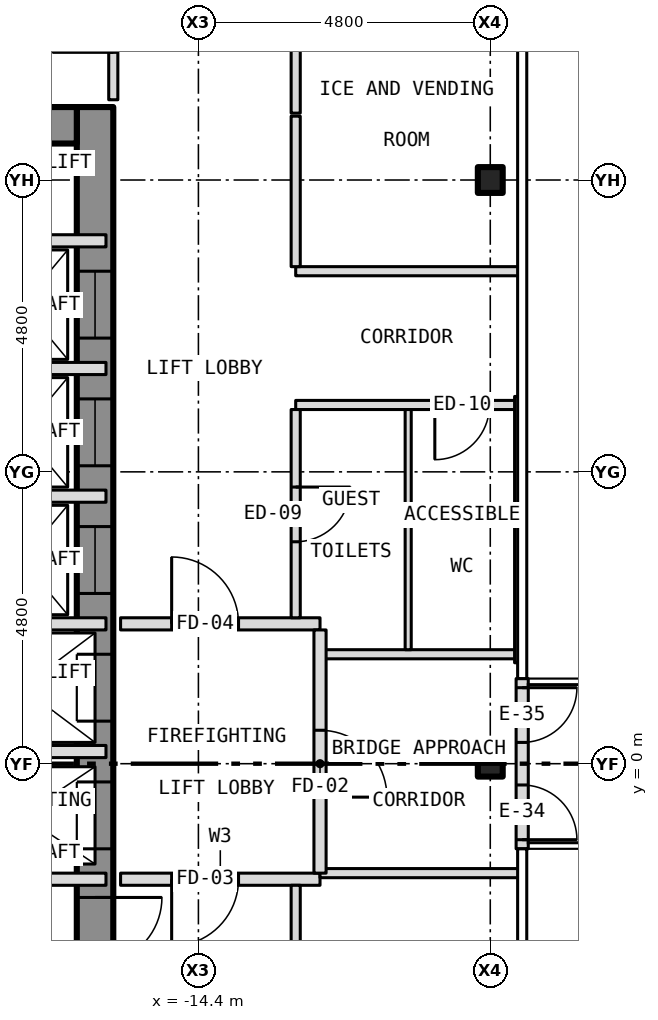
"""IFC4 building model, lengths in metres.
Left out: names, types, materials, properties, quantities, classifications, styles, units other than length and angle.
Written with IfcOpenShell. Run it as: python <this file> out.ifc"""

import sys

from ifc_helpers import new_model, si_unit, direction, frame, frame_2d, origin, origin_2d, place, context, subcontext, project, spatial, rectangle, i_section, extrude, element, fill, save


model = new_model("IFC4")
c1 = context("Model", 3, precision=1e-05, world=origin(), true_north=direction((0.0, 1.0)))
c2 = subcontext(c1, "Body", "Model", "MODEL_VIEW")
j1 = project(units=[si_unit("LENGTHUNIT", "METRE"), si_unit("PLANEANGLEUNIT", "RADIAN")], contexts=[c1])
p1 = place(None, origin())
s1 = spatial("IfcSite", under=j1, at=p1, CompositionType="ELEMENT")
p2 = place(p1, origin())
s2 = spatial("IfcBuilding", under=s1, at=p2, CompositionType="ELEMENT")
p3 = place(p2, frame((0.0, 0.0, 74.0)))
s3 = spatial("IfcBuildingStorey", under=s2, at=p3, CompositionType="ELEMENT", Elevation=74.0)
for number, where, z_axis, x_axis in (
    (1, (-9.6, 0.0, -0.15), (0.0, 0.0, 1.0), (1.0, 0.0, 0.0)),
    (2, (-9.6, 9.6, -0.15), (0.0, 0.0, 1.0), (1.0, 0.0, 0.0)),
):
    element("IfcColumn", number, at=place(p3, frame(where, z_axis=z_axis, x_axis=x_axis)), inside=s3, PredefinedType="COLUMN", context=c2, shape_type="SweptSolid", body=[
        extrude(i_section(OverallWidth=0.409, OverallDepth=0.424, WebThickness=0.033, FlangeThickness=0.052, at=origin_2d()), origin(), (0.0, 0.0, 1.0), 3.5),
    ])
p4 = place(p3, frame((-16.1, -10.8, 0.0), z_axis=(0.0, 0.0, 1.0), x_axis=(0.0, 1.0, 0.0)))
e3 = element("IfcWall", 3, at=p4, inside=s3, PredefinedType="SHEAR", context=c2, shape_type="SweptSolid", body=[
    extrude(rectangle(XDim=21.6, YDim=0.6, at=frame_2d((10.8, 0.0))), origin(), (0.0, 0.0, 1.0), 3.25),
])
p5 = place(p4, frame((9.4, 0.0, 0.0)))
e4 = element("IfcOpeningElement", 4, at=p5, cuts=e3, PredefinedType="OPENING", context=c2, shape_type="SweptSolid", body=[
    extrude(rectangle(XDim=1.1, YDim=2.1, at=frame_2d((0.55, 1.05))), frame((0.0, 0.312, 0.0), z_axis=(0.0, -1.0, 0.0), x_axis=(1.0, 0.0, 0.0)), (0.0, 0.0, 1.0), 0.624),
])
p6 = place(p4, frame((11.5, 0.0, 0.0)))
e5 = element("IfcOpeningElement", 5, at=p6, cuts=e3, PredefinedType="OPENING", context=c2, shape_type="SweptSolid", body=[
    extrude(rectangle(XDim=1.1, YDim=2.1, at=frame_2d((0.55, 1.05))), frame((0.0, 0.312, 0.0), z_axis=(0.0, -1.0, 0.0), x_axis=(1.0, 0.0, 0.0)), (0.0, 0.0, 1.0), 0.624),
])
p7 = place(p4, frame((13.6, 0.0, 0.0)))
e6 = element("IfcOpeningElement", 6, at=p7, cuts=e3, PredefinedType="OPENING", context=c2, shape_type="SweptSolid", body=[
    extrude(rectangle(XDim=1.1, YDim=2.1, at=frame_2d((0.55, 1.05))), frame((0.0, 0.312, 0.0), z_axis=(0.0, -1.0, 0.0), x_axis=(1.0, 0.0, 0.0)), (0.0, 0.0, 1.0), 0.624),
])
p8 = place(p4, frame((15.7, 0.0, 0.0)))
e7 = element("IfcOpeningElement", 7, at=p8, cuts=e3, PredefinedType="OPENING", context=c2, shape_type="SweptSolid", body=[
    extrude(rectangle(XDim=1.1, YDim=2.1, at=frame_2d((0.55, 1.05))), frame((0.0, 0.312, 0.0), z_axis=(0.0, -1.0, 0.0), x_axis=(1.0, 0.0, 0.0)), (0.0, 0.0, 1.0), 0.624),
])
p9 = place(p4, frame((17.8, 0.0, 0.0)))
e8 = element("IfcOpeningElement", 8, at=p9, cuts=e3, PredefinedType="OPENING", context=c2, shape_type="SweptSolid", body=[
    extrude(rectangle(XDim=1.1, YDim=2.1, at=frame_2d((0.55, 1.05))), frame((0.0, 0.312, 0.0), z_axis=(0.0, -1.0, 0.0), x_axis=(1.0, 0.0, 0.0)), (0.0, 0.0, 1.0), 0.624),
])
p10 = place(p4, frame((0.758, 0.0, 0.0)))
e9 = element("IfcOpeningElement", 9, at=p10, cuts=e3, PredefinedType="OPENING", context=c2, shape_type="SweptSolid", body=[
    extrude(rectangle(XDim=1.1, YDim=2.1, at=frame_2d((0.55, 1.05))), frame((0.0, 0.312, 0.0), z_axis=(0.0, -1.0, 0.0), x_axis=(1.0, 0.0, 0.0)), (0.0, 0.0, 1.0), 0.624),
])
p11 = place(p4, frame((7.5, 0.0, 0.0)))
e10 = element("IfcOpeningElement", 10, at=p11, cuts=e3, PredefinedType="OPENING", context=c2, shape_type="SweptSolid", body=[
    extrude(rectangle(XDim=1.1, YDim=2.1, at=frame_2d((0.55, 1.05))), frame((0.0, 0.312, 0.0), z_axis=(0.0, -1.0, 0.0), x_axis=(1.0, 0.0, 0.0)), (0.0, 0.0, 1.0), 0.624),
])
p12 = place(p3, frame((-23.4, 10.5, 0.0), z_axis=(0.0, 0.0, 1.0), x_axis=(1.0, 0.0, 0.0)))
e11 = element("IfcWall", 11, at=p12, inside=s3, PredefinedType="SHEAR", context=c2, shape_type="SweptSolid", body=[
    extrude(rectangle(XDim=7.0, YDim=0.6, at=frame_2d((3.5, 0.0))), origin(), (0.0, 0.0, 1.0), 3.25),
])
p13 = place(p3, frame((-9.075, -1.4, 0.0), z_axis=(0.0, 0.0, 1.0), x_axis=(0.0, 1.0, 0.0)))
e12 = element("IfcWall", 12, at=p13, inside=s3, PredefinedType="SOLIDWALL", context=c2, shape_type="SweptSolid", body=[
    extrude(rectangle(XDim=2.8, YDim=0.2, at=frame_2d((1.4, 0.0))), origin(), (0.0, 0.0, 1.0), 3.5),
])
p14 = place(p13, frame((0.15, 0.0, 0.0)))
e13 = element("IfcOpeningElement", 13, at=p14, cuts=e12, PredefinedType="OPENING", context=c2, shape_type="SweptSolid", body=[
    extrude(rectangle(XDim=0.9, YDim=2.1, at=frame_2d((0.45, 1.05))), frame((0.0, 0.112, 0.0), z_axis=(0.0, -1.0, 0.0), x_axis=(1.0, 0.0, 0.0)), (0.0, 0.0, 1.0), 0.224),
])
p15 = place(p13, frame((1.75, 0.0, 0.0)))
e14 = element("IfcOpeningElement", 14, at=p15, cuts=e12, PredefinedType="OPENING", context=c2, shape_type="SweptSolid", body=[
    extrude(rectangle(XDim=0.9, YDim=2.1, at=frame_2d((0.45, 1.05))), frame((0.0, 0.112, 0.0), z_axis=(0.0, -1.0, 0.0), x_axis=(1.0, 0.0, 0.0)), (0.0, 0.0, 1.0), 0.224),
])
p16 = place(p3, frame((-23.88, -1.9, 0.0), z_axis=(0.0, 0.0, 1.0), x_axis=(1.0, 0.0, 0.0)))
e15 = element("IfcWall", 15, at=p16, inside=s3, PredefinedType="PARTITIONING", context=c2, shape_type="SweptSolid", body=[
    extrude(rectangle(XDim=7.96, YDim=0.2, at=frame_2d((3.98, 0.0))), origin(), (0.0, 0.0, 1.0), 3.25),
])
p17 = place(p16, frame((3.32, 0.0, 0.0)))
e16 = element("IfcOpeningElement", 16, at=p17, cuts=e15, PredefinedType="OPENING", context=c2, shape_type="SweptSolid", body=[
    extrude(rectangle(XDim=0.9, YDim=2.1, at=frame_2d((0.45, 1.05))), frame((0.0, 0.112, 0.0), z_axis=(0.0, -1.0, 0.0), x_axis=(1.0, 0.0, 0.0)), (0.0, 0.0, 1.0), 0.224),
])
p18 = place(p3, frame((-15.68, -1.9, 0.0), z_axis=(0.0, 0.0, 1.0), x_axis=(1.0, 0.0, 0.0)))
e17 = element("IfcWall", 17, at=p18, inside=s3, PredefinedType="PARTITIONING", context=c2, shape_type="SweptSolid", body=[
    extrude(rectangle(XDim=3.28, YDim=0.2, at=frame_2d((1.64, 0.0))), origin(), (0.0, 0.0, 1.0), 3.35),
])
p19 = place(p18, frame((0.84, 0.0, 0.0)))
e18 = element("IfcOpeningElement", 18, at=p19, cuts=e17, PredefinedType="OPENING", context=c2, shape_type="SweptSolid", body=[
    extrude(rectangle(XDim=1.1, YDim=2.1, at=frame_2d((0.55, 1.05))), frame((0.0, 0.112, 0.0), z_axis=(0.0, -1.0, 0.0), x_axis=(1.0, 0.0, 0.0)), (0.0, 0.0, 1.0), 0.224),
])
p20 = place(p3, frame((-12.4, -1.8, 0.0), z_axis=(0.0, 0.0, 1.0), x_axis=(1.0, 0.0, 0.0)))
e19 = element("IfcWall", 19, at=p20, inside=s3, PredefinedType="PARTITIONING", context=c2, shape_type="SweptSolid", body=[
    extrude(rectangle(XDim=3.28, YDim=0.15, at=frame_2d((1.64, 0.0))), origin(), (0.0, 0.0, 1.0), 3.35),
])
p21 = place(p3, frame((-18.8, 0.2, 0.0), z_axis=(0.0, 0.0, 1.0), x_axis=(1.0, 0.0, 0.0)))
e20 = element("IfcWall", 20, at=p21, inside=s3, PredefinedType="PARTITIONING", context=c2, shape_type="SweptSolid", body=[
    extrude(rectangle(XDim=2.88, YDim=0.2, at=frame_2d((1.44, 0.0))), origin(), (0.0, 0.0, 1.0), 3.25),
])
p22 = place(p3, frame((-12.4, 1.8, 0.0), z_axis=(0.0, 0.0, 1.0), x_axis=(1.0, 0.0, 0.0)))
e21 = element("IfcWall", 21, at=p22, inside=s3, PredefinedType="PARTITIONING", context=c2, shape_type="SweptSolid", body=[
    extrude(rectangle(XDim=3.25, YDim=0.15, at=frame_2d((1.625, 0.0))), origin(), (0.0, 0.0, 1.0), 3.35),
])
p23 = place(p3, frame((-18.8, 2.3, 0.0), z_axis=(0.0, 0.0, 1.0), x_axis=(1.0, 0.0, 0.0)))
e22 = element("IfcWall", 22, at=p23, inside=s3, PredefinedType="PARTITIONING", context=c2, shape_type="SweptSolid", body=[
    extrude(rectangle(XDim=2.88, YDim=0.2, at=frame_2d((1.44, 0.0))), origin(), (0.0, 0.0, 1.0), 3.25),
])
p24 = place(p3, frame((-15.68, 2.3, 0.0), z_axis=(0.0, 0.0, 1.0), x_axis=(1.0, 0.0, 0.0)))
e23 = element("IfcWall", 23, at=p24, inside=s3, PredefinedType="PARTITIONING", context=c2, shape_type="SweptSolid", body=[
    extrude(rectangle(XDim=3.28, YDim=0.2, at=frame_2d((1.64, 0.0))), origin(), (0.0, 0.0, 1.0), 3.35),
])
p25 = place(p24, frame((0.84, 0.0, 0.0)))
e24 = element("IfcOpeningElement", 24, at=p25, cuts=e23, PredefinedType="OPENING", context=c2, shape_type="SweptSolid", body=[
    extrude(rectangle(XDim=1.1, YDim=2.1, at=frame_2d((0.55, 1.05))), frame((0.0, 0.112, 0.0), z_axis=(0.0, -1.0, 0.0), x_axis=(1.0, 0.0, 0.0)), (0.0, 0.0, 1.0), 0.224),
])
p26 = place(p3, frame((-18.8, 4.4, 0.0), z_axis=(0.0, 0.0, 1.0), x_axis=(1.0, 0.0, 0.0)))
e25 = element("IfcWall", 25, at=p26, inside=s3, PredefinedType="PARTITIONING", context=c2, shape_type="SweptSolid", body=[
    extrude(rectangle(XDim=2.88, YDim=0.2, at=frame_2d((1.44, 0.0))), origin(), (0.0, 0.0, 1.0), 3.25),
])
p27 = place(p3, frame((-12.8, 5.9, 0.0), z_axis=(0.0, 0.0, 1.0), x_axis=(1.0, 0.0, 0.0)))
e26 = element("IfcWall", 26, at=p27, inside=s3, PredefinedType="PARTITIONING", context=c2, shape_type="SweptSolid", body=[
    extrude(rectangle(XDim=3.65, YDim=0.15, at=frame_2d((1.825, 0.0))), origin(), (0.0, 0.0, 1.0), 3.35),
])
p28 = place(p27, frame((2.288, 0.0, 0.0)))
e27 = element("IfcOpeningElement", 27, at=p28, cuts=e26, PredefinedType="OPENING", context=c2, shape_type="SweptSolid", body=[
    extrude(rectangle(XDim=0.9, YDim=2.1, at=frame_2d((0.45, 1.05))), frame((0.0, 0.087, 0.0), z_axis=(0.0, -1.0, 0.0), x_axis=(1.0, 0.0, 0.0)), (0.0, 0.0, 1.0), 0.174),
])
p29 = place(p3, frame((-18.8, 6.5, 0.0), z_axis=(0.0, 0.0, 1.0), x_axis=(1.0, 0.0, 0.0)))
e28 = element("IfcWall", 28, at=p29, inside=s3, PredefinedType="PARTITIONING", context=c2, shape_type="SweptSolid", body=[
    extrude(rectangle(XDim=2.88, YDim=0.2, at=frame_2d((1.44, 0.0))), origin(), (0.0, 0.0, 1.0), 3.25),
])
p30 = place(p3, frame((-12.8, 8.1, 0.0), z_axis=(0.0, 0.0, 1.0), x_axis=(1.0, 0.0, 0.0)))
e29 = element("IfcWall", 29, at=p30, inside=s3, PredefinedType="PARTITIONING", context=c2, shape_type="SweptSolid", body=[
    extrude(rectangle(XDim=3.68, YDim=0.15, at=frame_2d((1.84, 0.0))), origin(), (0.0, 0.0, 1.0), 3.35),
])
p31 = place(p3, frame((-18.8, 8.6, 0.0), z_axis=(0.0, 0.0, 1.0), x_axis=(1.0, 0.0, 0.0)))
e30 = element("IfcWall", 30, at=p31, inside=s3, PredefinedType="PARTITIONING", context=c2, shape_type="SweptSolid", body=[
    extrude(rectangle(XDim=2.88, YDim=0.2, at=frame_2d((1.44, 0.0))), origin(), (0.0, 0.0, 1.0), 3.25),
])
p32 = place(p3, frame((-15.8, 10.92, 0.0), z_axis=(0.0, 0.0, 1.0), x_axis=(0.0, 1.0, 0.0)))
e31 = element("IfcWall", 31, at=p32, inside=s3, PredefinedType="PARTITIONING", context=c2, shape_type="SweptSolid", body=[
    extrude(rectangle(XDim=4.805, YDim=0.15, at=frame_2d((2.403, 0.0))), origin(), (0.0, 0.0, 1.0), 3.35),
])
p33 = place(p32, frame((0.78, 0.0, 0.0)))
e32 = element("IfcOpeningElement", 32, at=p33, cuts=e31, PredefinedType="OPENING", context=c2, shape_type="SweptSolid", body=[
    extrude(rectangle(XDim=1.0, YDim=2.1, at=frame_2d((0.5, 1.05))), frame((0.0, 0.087, 0.0), z_axis=(0.0, -1.0, 0.0), x_axis=(1.0, 0.0, 0.0)), (0.0, 0.0, 1.0), 0.174),
])
p34 = place(p3, frame((-12.8, -13.525, 0.0), z_axis=(0.0, 0.0, 1.0), x_axis=(0.0, 1.0, 0.0)))
e33 = element("IfcWall", 33, at=p34, inside=s3, PredefinedType="PARTITIONING", context=c2, shape_type="SweptSolid", body=[
    extrude(rectangle(XDim=11.525, YDim=0.15, at=frame_2d((5.762, 0.0))), origin(), (0.0, 0.0, 1.0), 3.35),
])
p35 = place(p34, frame((6.725, 0.0, 0.0)))
e34 = element("IfcOpeningElement", 34, at=p35, cuts=e33, PredefinedType="OPENING", context=c2, shape_type="SweptSolid", body=[
    extrude(rectangle(XDim=0.9, YDim=2.1, at=frame_2d((0.45, 1.05))), frame((0.0, 0.087, 0.0), z_axis=(0.0, -1.0, 0.0), x_axis=(1.0, 0.0, 0.0)), (0.0, 0.0, 1.0), 0.174),
])
p36 = place(p3, frame((-12.8, 2.4, 0.0), z_axis=(0.0, 0.0, 1.0), x_axis=(0.0, 1.0, 0.0)))
e35 = element("IfcWall", 35, at=p36, inside=s3, PredefinedType="PARTITIONING", context=c2, shape_type="SweptSolid", body=[
    extrude(rectangle(XDim=3.425, YDim=0.15, at=frame_2d((1.712, 0.0))), origin(), (0.0, 0.0, 1.0), 3.35),
])
p37 = place(p36, frame((1.25, 0.0, 0.0)))
e36 = element("IfcOpeningElement", 36, at=p37, cuts=e35, PredefinedType="OPENING", context=c2, shape_type="SweptSolid", body=[
    extrude(rectangle(XDim=0.9, YDim=2.1, at=frame_2d((0.45, 1.05))), frame((0.0, 0.087, 0.0), z_axis=(0.0, -1.0, 0.0), x_axis=(1.0, 0.0, 0.0)), (0.0, 0.0, 1.0), 0.174),
])
p38 = place(p3, frame((-12.8, 8.175, 0.0), z_axis=(0.0, 0.0, 1.0), x_axis=(0.0, 1.0, 0.0)))
e37 = element("IfcWall", 37, at=p38, inside=s3, PredefinedType="PARTITIONING", context=c2, shape_type="SweptSolid", body=[
    extrude(rectangle(XDim=2.475, YDim=0.15, at=frame_2d((1.237, 0.0))), origin(), (0.0, 0.0, 1.0), 3.35),
])
p39 = place(p3, frame((-12.8, 10.7, 0.0), z_axis=(0.0, 0.0, 1.0), x_axis=(0.0, 1.0, 0.0)))
e38 = element("IfcWall", 38, at=p39, inside=s3, PredefinedType="PARTITIONING", context=c2, shape_type="SweptSolid", body=[
    extrude(rectangle(XDim=2.825, YDim=0.15, at=frame_2d((1.413, 0.0))), origin(), (0.0, 0.0, 1.0), 3.35),
])
p40 = place(p3, frame((-12.4, -1.8, 0.0), z_axis=(0.0, 0.0, 1.0), x_axis=(0.0, 1.0, 0.0)))
e39 = element("IfcWall", 39, at=p40, inside=s3, PredefinedType="PARTITIONING", context=c2, shape_type="SweptSolid", body=[
    extrude(rectangle(XDim=4.0, YDim=0.2, at=frame_2d((2.0, 0.0))), origin(), (0.0, 0.0, 1.0), 3.35),
])
p41 = place(p40, frame((1.25, 0.0, 0.0)))
e40 = element("IfcOpeningElement", 40, at=p41, cuts=e39, PredefinedType="OPENING", context=c2, shape_type="SweptSolid", body=[
    extrude(rectangle(XDim=1.1, YDim=2.1, at=frame_2d((0.55, 1.05))), frame((0.0, 0.112, 0.0), z_axis=(0.0, -1.0, 0.0), x_axis=(1.0, 0.0, 0.0)), (0.0, 0.0, 1.0), 0.224),
])
p42 = place(p3, frame((-10.95, 1.875, 0.0), z_axis=(0.0, 0.0, 1.0), x_axis=(0.0, 1.0, 0.0)))
e41 = element("IfcWall", 41, at=p42, inside=s3, PredefinedType="PARTITIONING", context=c2, shape_type="SweptSolid", body=[
    extrude(rectangle(XDim=3.95, YDim=0.1, at=frame_2d((1.975, 0.0))), origin(), (0.0, 0.0, 1.0), 3.35),
])
p43 = place(p3, frame((-9.15, 1.66, 0.0), z_axis=(0.0, 0.0, 1.0), x_axis=(0.0, 1.0, 0.0)))
e42 = element("IfcWall", 42, at=p43, inside=s3, PredefinedType="PARTITIONING", context=c2, shape_type="SweptSolid", body=[
    extrude(rectangle(XDim=4.38, YDim=0.1, at=frame_2d((2.19, 0.0))), origin(), (0.0, 0.0, 1.0), 2.733),
])
p44 = place(p14, origin())
e43 = element("IfcDoor", 43, at=p44, inside=s3, OperationType="SINGLE_SWING_LEFT", PredefinedType="DOOR", context=c2, shape_type="SweptSolid", body=[
    extrude(rectangle(XDim=0.9, YDim=2.1, at=frame_2d((0.45, 1.05))), frame((0.0, 0.025, 0.0), z_axis=(0.0, -1.0, 0.0), x_axis=(1.0, 0.0, 0.0)), (0.0, 0.0, 1.0), 0.05),
])
fill(e13, e43)
p45 = place(p15, origin())
e44 = element("IfcDoor", 44, at=p45, inside=s3, OperationType="SINGLE_SWING_RIGHT", PredefinedType="DOOR", context=c2, shape_type="SweptSolid", body=[
    extrude(rectangle(XDim=0.9, YDim=2.1, at=frame_2d((0.45, 1.05))), frame((0.0, 0.025, 0.0), z_axis=(0.0, -1.0, 0.0), x_axis=(1.0, 0.0, 0.0)), (0.0, 0.0, 1.0), 0.05),
])
fill(e14, e44)
p46 = place(p5, origin())
e45 = element("IfcDoor", 45, at=p46, inside=s3, OperationType="SLIDING_TO_LEFT", PredefinedType="DOOR", context=c2, shape_type="SweptSolid", body=[
    extrude(rectangle(XDim=1.1, YDim=2.1, at=frame_2d((0.55, 1.05))), frame((0.0, 0.025, 0.0), z_axis=(0.0, -1.0, 0.0), x_axis=(1.0, 0.0, 0.0)), (0.0, 0.0, 1.0), 0.05),
])
fill(e4, e45)
p47 = place(p6, origin())
e46 = element("IfcDoor", 46, at=p47, inside=s3, OperationType="SLIDING_TO_LEFT", PredefinedType="DOOR", context=c2, shape_type="SweptSolid", body=[
    extrude(rectangle(XDim=1.1, YDim=2.1, at=frame_2d((0.55, 1.05))), frame((0.0, 0.025, 0.0), z_axis=(0.0, -1.0, 0.0), x_axis=(1.0, 0.0, 0.0)), (0.0, 0.0, 1.0), 0.05),
])
fill(e5, e46)
p48 = place(p7, origin())
e47 = element("IfcDoor", 47, at=p48, inside=s3, OperationType="SLIDING_TO_LEFT", PredefinedType="DOOR", context=c2, shape_type="SweptSolid", body=[
    extrude(rectangle(XDim=1.1, YDim=2.1, at=frame_2d((0.55, 1.05))), frame((0.0, 0.025, 0.0), z_axis=(0.0, -1.0, 0.0), x_axis=(1.0, 0.0, 0.0)), (0.0, 0.0, 1.0), 0.05),
])
fill(e6, e47)
p49 = place(p8, origin())
e48 = element("IfcDoor", 48, at=p49, inside=s3, OperationType="SLIDING_TO_LEFT", PredefinedType="DOOR", context=c2, shape_type="SweptSolid", body=[
    extrude(rectangle(XDim=1.1, YDim=2.1, at=frame_2d((0.55, 1.05))), frame((0.0, 0.025, 0.0), z_axis=(0.0, -1.0, 0.0), x_axis=(1.0, 0.0, 0.0)), (0.0, 0.0, 1.0), 0.05),
])
fill(e7, e48)
p50 = place(p9, origin())
e49 = element("IfcDoor", 49, at=p50, inside=s3, OperationType="SLIDING_TO_LEFT", PredefinedType="DOOR", context=c2, shape_type="SweptSolid", body=[
    extrude(rectangle(XDim=1.1, YDim=2.1, at=frame_2d((0.55, 1.05))), frame((0.0, 0.025, 0.0), z_axis=(0.0, -1.0, 0.0), x_axis=(1.0, 0.0, 0.0)), (0.0, 0.0, 1.0), 0.05),
])
fill(e8, e49)
p51 = place(p11, origin())
e50 = element("IfcDoor", 50, at=p51, inside=s3, OperationType="SINGLE_SWING_RIGHT", PredefinedType="DOOR", context=c2, shape_type="SweptSolid", body=[
    extrude(rectangle(XDim=1.1, YDim=2.1, at=frame_2d((0.55, 1.05))), frame((0.0, 0.025, 0.0), z_axis=(0.0, -1.0, 0.0), x_axis=(1.0, 0.0, 0.0)), (0.0, 0.0, 1.0), 0.05),
])
fill(e10, e50)
p52 = place(p41, origin())
e51 = element("IfcDoor", 51, at=p52, inside=s3, OperationType="SINGLE_SWING_LEFT", PredefinedType="DOOR", context=c2, shape_type="SweptSolid", body=[
    extrude(rectangle(XDim=1.1, YDim=2.1, at=frame_2d((0.55, 1.05))), frame((0.0, 0.025, 0.0), z_axis=(0.0, -1.0, 0.0), x_axis=(1.0, 0.0, 0.0)), (0.0, 0.0, 1.0), 0.05),
])
fill(e40, e51)
p53 = place(p19, origin())
e52 = element("IfcDoor", 52, at=p53, inside=s3, OperationType="SINGLE_SWING_LEFT", PredefinedType="DOOR", context=c2, shape_type="SweptSolid", body=[
    extrude(rectangle(XDim=1.1, YDim=2.1, at=frame_2d((0.55, 1.05))), frame((0.0, 0.025, 0.0), z_axis=(0.0, -1.0, 0.0), x_axis=(1.0, 0.0, 0.0)), (0.0, 0.0, 1.0), 0.05),
])
fill(e18, e52)
p54 = place(p25, origin())
e53 = element("IfcDoor", 53, at=p54, inside=s3, OperationType="SINGLE_SWING_LEFT", PredefinedType="DOOR", context=c2, shape_type="SweptSolid", body=[
    extrude(rectangle(XDim=1.1, YDim=2.1, at=frame_2d((0.55, 1.05))), frame((0.0, 0.025, 0.0), z_axis=(0.0, -1.0, 0.0), x_axis=(1.0, 0.0, 0.0)), (0.0, 0.0, 1.0), 0.05),
])
fill(e24, e53)
p55 = place(p37, origin())
e54 = element("IfcDoor", 54, at=p55, inside=s3, OperationType="SINGLE_SWING_RIGHT", PredefinedType="DOOR", context=c2, shape_type="SweptSolid", body=[
    extrude(rectangle(XDim=0.9, YDim=2.1, at=frame_2d((0.45, 1.05))), frame((0.0, 0.025, 0.0), z_axis=(0.0, -1.0, 0.0), x_axis=(1.0, 0.0, 0.0)), (0.0, 0.0, 1.0), 0.05),
])
fill(e36, e54)
p56 = place(p28, origin())
e55 = element("IfcDoor", 55, at=p56, inside=s3, OperationType="SINGLE_SWING_LEFT", PredefinedType="DOOR", context=c2, shape_type="SweptSolid", body=[
    extrude(rectangle(XDim=0.9, YDim=2.1, at=frame_2d((0.45, 1.05))), frame((0.0, 0.025, 0.0), z_axis=(0.0, -1.0, 0.0), x_axis=(1.0, 0.0, 0.0)), (0.0, 0.0, 1.0), 0.05),
])
fill(e27, e55)
save(model, sys.argv[1])
